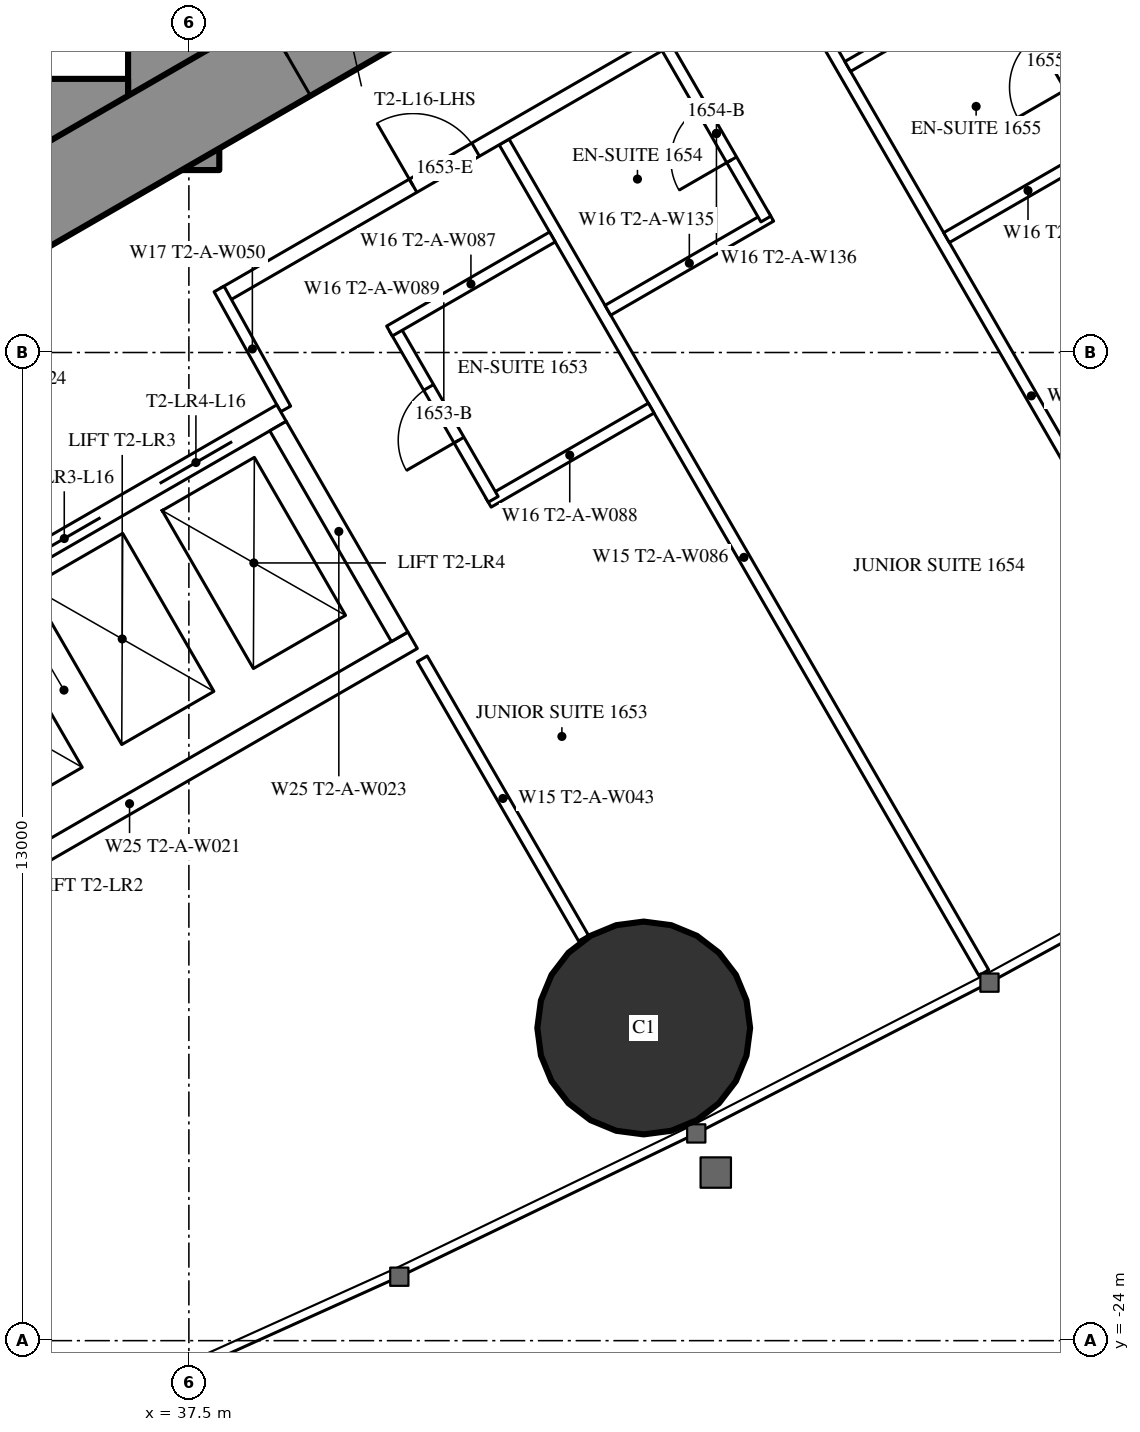
"""IFC4 building model, lengths in metres.
Left out: names, types, materials, properties, quantities, classifications, styles, units other than length and angle.
Written with IfcOpenShell. Run it as: python <this file> out.ifc"""

import sys

from ifc_helpers import new_model, si_unit, direction, frame, frame_2d, origin, origin_2d, place, context, subcontext, project, spatial, rectangle, hollow_circle, extrude, element, fill, save


model = new_model("IFC4")
c1 = context("Model", 3, precision=1e-05, world=origin(), true_north=direction((0.0, 1.0)))
c2 = subcontext(c1, "Body", "Model", "MODEL_VIEW")
j1 = project(units=[si_unit("LENGTHUNIT", "METRE"), si_unit("PLANEANGLEUNIT", "RADIAN")], contexts=[c1])
p1 = place(None, origin())
s1 = spatial("IfcSite", under=j1, at=p1, CompositionType="ELEMENT")
p2 = place(p1, origin())
s2 = spatial("IfcBuilding", under=s1, at=p2, CompositionType="ELEMENT")
p3 = place(p2, frame((0.0, 0.0, 63.5)))
s3 = spatial("IfcBuildingStorey", under=s2, at=p3, CompositionType="ELEMENT", Elevation=63.5)
p4 = place(p3, frame((43.484, -19.886, 0.0), z_axis=(0.0, 0.0, 1.0), x_axis=(1.0, 0.0, 0.0)))
e1 = element("IfcColumn", 1, at=p4, inside=s3, PredefinedType="COLUMN", context=c2, shape_type="SweptSolid", body=[
    extrude(hollow_circle(Radius=1.4, WallThickness=0.12, at=origin_2d()), origin(), (0.0, 0.0, 1.0), 3.5),
])
p5 = place(p3, frame((37.3, -8.6, 0.0), z_axis=(0.0, 0.0, 1.0), x_axis=(0.0, 1.0, 0.0)))
e2 = element("IfcWall", 2, at=p5, inside=s3, PredefinedType="SHEAR", context=c2, shape_type="SweptSolid", body=[
    extrude(rectangle(XDim=17.2, YDim=1.2, at=frame_2d((8.6, 0.0))), origin(), (0.0, 0.0, 1.0), 3.5),
])
p6 = place(p5, frame((7.7, 0.0, 0.0)))
e3 = element("IfcOpeningElement", 3, at=p6, cuts=e2, PredefinedType="OPENING", context=c2, shape_type="SweptSolid", body=[
    extrude(rectangle(XDim=1.8, YDim=2.2, at=frame_2d((0.9, 1.1))), frame((0.0, 0.61, 0.0), z_axis=(0.0, -1.0, 0.0), x_axis=(1.0, 0.0, 0.0)), (0.0, 0.0, 1.0), 1.22),
])
p7 = place(p3, frame((28.3, -8.0, 0.0), z_axis=(0.0, 0.0, 1.0), x_axis=(1.0, 0.0, 0.0)))
e4 = element("IfcWall", 4, at=p7, inside=s3, PredefinedType="SHEAR", context=c2, shape_type="SweptSolid", body=[
    extrude(rectangle(XDim=8.4, YDim=1.2, at=frame_2d((4.2, 0.0))), origin(), (0.0, 0.0, 1.0), 3.5),
])
p8 = place(p7, frame((0.25, 0.0, 0.0)))
e5 = element("IfcOpeningElement", 5, at=p8, cuts=e4, PredefinedType="OPENING", context=c2, shape_type="SweptSolid", body=[
    extrude(rectangle(XDim=1.0, YDim=2.2, at=frame_2d((0.5, 1.1))), frame((0.0, 0.61, 0.0), z_axis=(0.0, -1.0, 0.0), x_axis=(1.0, 0.0, 0.0)), (0.0, 0.0, 1.0), 1.22),
])
p9 = place(p3, frame((27.2, -13.8, 0.0), z_axis=(0.0, 0.0, 1.0), x_axis=(0.866027159892, 0.499996958321, 0.0)))
e6 = element("IfcWall", 6, at=p9, inside=s3, PredefinedType="SHEAR", context=c2, shape_type="SweptSolid", body=[
    extrude(rectangle(XDim=27.947, YDim=1.2, at=frame_2d((13.973, 0.0))), origin(), (0.0, 0.0, 1.0), 3.5),
])
p10 = place(p9, frame((4.6, 0.0, 0.0)))
e7 = element("IfcOpeningElement", 7, at=p10, cuts=e6, PredefinedType="OPENING", context=c2, shape_type="SweptSolid", body=[
    extrude(rectangle(XDim=1.0, YDim=2.2, at=frame_2d((0.5, 1.1))), frame((0.0, 0.61, 0.0), z_axis=(0.0, -1.0, 0.0), x_axis=(1.0, 0.0, 0.0)), (0.0, 0.0, 1.0), 1.22),
])
p11 = place(p9, frame((13.395, 0.0, 0.0)))
e8 = element("IfcOpeningElement", 8, at=p11, cuts=e6, PredefinedType="OPENING", context=c2, shape_type="SweptSolid", body=[
    extrude(rectangle(XDim=1.8, YDim=2.2, at=frame_2d((0.9, 1.1))), frame((0.0, 0.61, 0.0), z_axis=(0.0, -1.0, 0.0), x_axis=(1.0, 0.0, 0.0)), (0.0, 0.0, 1.0), 1.22),
])
p12 = place(p3, frame((41.647, -8.23, 0.0), z_axis=(0.0, 0.0, 1.0), x_axis=(0.49998590462, -0.866033541603, 0.0)))
e9 = element("IfcWall", 9, at=p12, inside=s3, PredefinedType="PARTITIONING", context=c2, shape_type="SweptSolid", body=[
    extrude(rectangle(XDim=12.621, YDim=0.15, at=frame_2d((6.311, 0.0))), origin(), (0.0, 0.0, 1.0), 3.25),
])
p13 = place(p3, frame((45.403, -6.062, 0.0), z_axis=(0.0, 0.0, 1.0), x_axis=(0.500007077968, -0.866021317279, 0.0)))
e10 = element("IfcWall", 10, at=p13, inside=s3, PredefinedType="PARTITIONING", context=c2, shape_type="SweptSolid", body=[
    extrude(rectangle(XDim=12.721, YDim=0.15, at=frame_2d((6.361, 0.0))), origin(), (0.0, 0.0, 1.0), 3.25),
])
p14 = place(p3, frame((40.57, -15.03, 0.0), z_axis=(0.0, 0.0, 1.0), x_axis=(0.500012993597, -0.866017901798, 0.0)))
e11 = element("IfcWall", 11, at=p14, inside=s3, PredefinedType="PARTITIONING", context=c2, shape_type="SweptSolid", body=[
    extrude(rectangle(XDim=4.243, YDim=0.15, at=frame_2d((2.122, 0.0))), origin(), (0.0, 0.0, 1.0), 3.25),
])
p15 = place(p3, frame((37.96, -10.243, 0.0), z_axis=(0.0, 0.0, 1.0), x_axis=(0.866026429433, 0.499998223521, 0.0)))
e12 = element("IfcWall", 12, at=p15, inside=s3, PredefinedType="PARTITIONING", context=c2, shape_type="SweptSolid", body=[
    extrude(rectangle(XDim=20.487, YDim=0.2, at=frame_2d((10.243, 0.0))), origin(), (0.0, 0.0, 1.0), 3.25),
])
p16 = place(p15, frame((6.925, 0.0, 0.0)))
e13 = element("IfcOpeningElement", 13, at=p16, cuts=e12, PredefinedType="OPENING", context=c2, shape_type="SweptSolid", body=[
    extrude(rectangle(XDim=0.95, YDim=2.2, at=frame_2d((0.475, 1.1))), frame((0.0, 0.11, 0.0), z_axis=(0.0, -1.0, 0.0), x_axis=(1.0, 0.0, 0.0)), (0.0, 0.0, 1.0), 0.22),
])
p17 = place(p15, frame((8.912, 0.0, 0.0)))
e14 = element("IfcOpeningElement", 14, at=p17, cuts=e12, PredefinedType="OPENING", context=c2, shape_type="SweptSolid", body=[
    extrude(rectangle(XDim=0.95, YDim=2.2, at=frame_2d((0.475, 1.1))), frame((0.0, 0.11, 0.0), z_axis=(0.0, -1.0, 0.0), x_axis=(1.0, 0.0, 0.0)), (0.0, 0.0, 1.0), 0.22),
])
p18 = place(p15, frame((13.535, 0.0, 0.0)))
e15 = element("IfcOpeningElement", 15, at=p18, cuts=e12, PredefinedType="OPENING", context=c2, shape_type="SweptSolid", body=[
    extrude(rectangle(XDim=0.95, YDim=2.2, at=frame_2d((0.475, 1.1))), frame((0.0, 0.11, 0.0), z_axis=(0.0, -1.0, 0.0), x_axis=(1.0, 0.0, 0.0)), (0.0, 0.0, 1.0), 0.22),
])
p19 = place(p15, frame((17.585, 0.0, 0.0)))
e16 = element("IfcOpeningElement", 16, at=p19, cuts=e12, PredefinedType="OPENING", context=c2, shape_type="SweptSolid", body=[
    extrude(rectangle(XDim=0.95, YDim=2.2, at=frame_2d((0.475, 1.1))), frame((0.0, 0.11, 0.0), z_axis=(0.0, -1.0, 0.0), x_axis=(1.0, 0.0, 0.0)), (0.0, 0.0, 1.0), 0.22),
])
p20 = place(p15, frame((2.875, 0.0, 0.0)))
e17 = element("IfcOpeningElement", 17, at=p20, cuts=e12, PredefinedType="OPENING", context=c2, shape_type="SweptSolid", body=[
    extrude(rectangle(XDim=0.95, YDim=2.2, at=frame_2d((0.475, 1.1))), frame((0.0, 0.11, 0.0), z_axis=(0.0, -1.0, 0.0), x_axis=(1.0, 0.0, 0.0)), (0.0, 0.0, 1.0), 0.22),
])
p21 = place(p3, frame((38.773, -11.742, 0.0), z_axis=(0.0, 0.0, 1.0), x_axis=(-0.485528096672, 0.8742210632, 0.0)))
e18 = element("IfcWall", 18, at=p21, inside=s3, PredefinedType="PARTITIONING", context=c2, shape_type="SweptSolid", body=[
    extrude(rectangle(XDim=1.805, YDim=0.15, at=frame_2d((0.903, 0.0))), origin(), (0.0, 0.0, 1.0), 3.25),
])
p22 = place(p3, frame((43.012, -10.444, 0.0), z_axis=(0.0, 0.0, 1.0), x_axis=(0.866031185235, 0.4999899861, 0.0)))
e19 = element("IfcWall", 19, at=p22, inside=s3, PredefinedType="PARTITIONING", context=c2, shape_type="SweptSolid", body=[
    extrude(rectangle(XDim=2.475, YDim=0.15, at=frame_2d((1.238, 0.0))), origin(), (0.0, 0.0, 1.0), 3.25),
])
p23 = place(p3, frame((43.791, -6.993, 0.0), z_axis=(0.0, 0.0, 1.0), x_axis=(0.500047596559, -0.865997922154, 0.0)))
e20 = element("IfcWall", 20, at=p23, inside=s3, PredefinedType="PARTITIONING", context=c2, shape_type="SweptSolid", body=[
    extrude(rectangle(XDim=2.6, YDim=0.15, at=frame_2d((1.3, 0.0))), origin(), (0.0, 0.0, 1.0), 3.25),
])
p24 = place(p23, frame((0.9, 0.0, 0.0)))
e21 = element("IfcOpeningElement", 21, at=p24, cuts=e20, PredefinedType="OPENING", context=c2, shape_type="SweptSolid", body=[
    extrude(rectangle(XDim=0.8, YDim=2.2, at=frame_2d((0.4, 1.1))), frame((0.0, 0.085, 0.0), z_axis=(0.0, -1.0, 0.0), x_axis=(1.0, 0.0, 0.0)), (0.0, 0.0, 1.0), 0.17),
])
p25 = place(p3, frame((47.468, -9.488, 0.0), z_axis=(0.0, 0.0, 1.0), x_axis=(0.86604923931, 0.499958713387, 0.0)))
e22 = element("IfcWall", 22, at=p25, inside=s3, PredefinedType="PARTITIONING", context=c2, shape_type="SweptSolid", body=[
    extrude(rectangle(XDim=2.475, YDim=0.15, at=frame_2d((1.237, 0.0))), origin(), (0.0, 0.0, 1.0), 3.25),
])
p26 = place(p3, frame((48.246, -6.037, 0.0), z_axis=(0.0, 0.0, 1.0), x_axis=(0.500006934395, -0.866021400173, 0.0)))
e23 = element("IfcWall", 23, at=p26, inside=s3, PredefinedType="PARTITIONING", context=c2, shape_type="SweptSolid", body=[
    extrude(rectangle(XDim=2.6, YDim=0.15, at=frame_2d((1.3, 0.0))), origin(), (0.0, 0.0, 1.0), 3.25),
])
p27 = place(p26, frame((0.9, 0.0, 0.0)))
e24 = element("IfcOpeningElement", 24, at=p27, cuts=e23, PredefinedType="OPENING", context=c2, shape_type="SweptSolid", body=[
    extrude(rectangle(XDim=0.8, YDim=2.2, at=frame_2d((0.4, 1.1))), frame((0.0, 0.085, 0.0), z_axis=(0.0, -1.0, 0.0), x_axis=(1.0, 0.0, 0.0)), (0.0, 0.0, 1.0), 0.17),
])
p28 = place(p3, frame((46.168, -7.237, 0.0), z_axis=(0.0, 0.0, 1.0), x_axis=(0.866006523861, 0.500032699561, 0.0)))
e25 = element("IfcWall", 25, at=p28, inside=s3, PredefinedType="PARTITIONING", context=c2, shape_type="SweptSolid", body=[
    extrude(rectangle(XDim=2.475, YDim=0.15, at=frame_2d((1.237, 0.0))), origin(), (0.0, 0.0, 1.0), 3.25),
])
p29 = place(p3, frame((41.439, -12.969, 0.0), z_axis=(0.0, 0.0, 1.0), x_axis=(0.866031185235, 0.4999899861, 0.0)))
e26 = element("IfcWall", 26, at=p29, inside=s3, PredefinedType="PARTITIONING", context=c2, shape_type="SweptSolid", body=[
    extrude(rectangle(XDim=2.475, YDim=0.15, at=frame_2d((1.238, 0.0))), origin(), (0.0, 0.0, 1.0), 3.25),
])
p30 = place(p3, frame((40.204, -10.68, 0.0), z_axis=(0.0, 0.0, 1.0), x_axis=(0.500006934395, -0.866021400173, 0.0)))
e27 = element("IfcWall", 27, at=p30, inside=s3, PredefinedType="PARTITIONING", context=c2, shape_type="SweptSolid", body=[
    extrude(rectangle(XDim=2.6, YDim=0.15, at=frame_2d((1.3, 0.0))), origin(), (0.0, 0.0, 1.0), 3.25),
])
p31 = place(p30, frame((0.9, 0.0, 0.0)))
e28 = element("IfcOpeningElement", 28, at=p31, cuts=e27, PredefinedType="OPENING", context=c2, shape_type="SweptSolid", body=[
    extrude(rectangle(XDim=0.8, YDim=2.2, at=frame_2d((0.4, 1.1))), frame((0.0, 0.085, 0.0), z_axis=(0.0, -1.0, 0.0), x_axis=(1.0, 0.0, 0.0)), (0.0, 0.0, 1.0), 0.17),
])
p32 = place(p3, frame((40.139, -10.718, 0.0), z_axis=(0.0, 0.0, 1.0), x_axis=(0.866031185235, 0.4999899861, 0.0)))
e29 = element("IfcWall", 29, at=p32, inside=s3, PredefinedType="PARTITIONING", context=c2, shape_type="SweptSolid", body=[
    extrude(rectangle(XDim=2.475, YDim=0.15, at=frame_2d((1.238, 0.0))), origin(), (0.0, 0.0, 1.0), 3.25),
])
p33 = place(p3, frame((31.271, -16.097, 0.0), z_axis=(0.0, 0.0, 1.0), x_axis=(0.86604045752, 0.499973925258, 0.0)))
e30 = element("IfcWall", 30, at=p33, inside=s3, PredefinedType="PARTITIONING", context=c2, shape_type="SweptSolid", body=[
    extrude(rectangle(XDim=8.6, YDim=0.25, at=frame_2d((4.3, 0.0))), origin(), (0.0, 0.0, 1.0), 3.25),
])
p34 = place(p33, frame((0.75, 0.0, 0.0)))
e31 = element("IfcOpeningElement", 31, at=p34, cuts=e30, PredefinedType="OPENING", context=c2, shape_type="SweptSolid", body=[
    extrude(rectangle(XDim=1.1, YDim=2.2, at=frame_2d((0.55, 1.1))), frame((0.0, 0.135, 0.0), z_axis=(0.0, -1.0, 0.0), x_axis=(1.0, 0.0, 0.0)), (0.0, 0.0, 1.0), 0.27),
])
p35 = place(p33, frame((2.75, 0.0, 0.0)))
e32 = element("IfcOpeningElement", 32, at=p35, cuts=e30, PredefinedType="OPENING", context=c2, shape_type="SweptSolid", body=[
    extrude(rectangle(XDim=1.1, YDim=2.2, at=frame_2d((0.55, 1.1))), frame((0.0, 0.135, 0.0), z_axis=(0.0, -1.0, 0.0), x_axis=(1.0, 0.0, 0.0)), (0.0, 0.0, 1.0), 0.27),
])
p36 = place(p33, frame((4.75, 0.0, 0.0)))
e33 = element("IfcOpeningElement", 33, at=p36, cuts=e30, PredefinedType="OPENING", context=c2, shape_type="SweptSolid", body=[
    extrude(rectangle(XDim=1.1, YDim=2.2, at=frame_2d((0.55, 1.1))), frame((0.0, 0.135, 0.0), z_axis=(0.0, -1.0, 0.0), x_axis=(1.0, 0.0, 0.0)), (0.0, 0.0, 1.0), 0.27),
])
p37 = place(p33, frame((6.75, 0.0, 0.0)))
e34 = element("IfcOpeningElement", 34, at=p37, cuts=e30, PredefinedType="OPENING", context=c2, shape_type="SweptSolid", body=[
    extrude(rectangle(XDim=1.1, YDim=2.2, at=frame_2d((0.55, 1.1))), frame((0.0, 0.135, 0.0), z_axis=(0.0, -1.0, 0.0), x_axis=(1.0, 0.0, 0.0)), (0.0, 0.0, 1.0), 0.27),
])
p38 = place(p3, frame((32.996, -19.086, 0.0), z_axis=(0.0, 0.0, 1.0), x_axis=(0.866028165386, 0.499995216735, 0.0)))
e35 = element("IfcWall", 35, at=p38, inside=s3, PredefinedType="PARTITIONING", context=c2, shape_type="SweptSolid", body=[
    extrude(rectangle(XDim=8.6, YDim=0.25, at=frame_2d((4.3, 0.0))), origin(), (0.0, 0.0, 1.0), 3.25),
])
p39 = place(p3, frame((38.673, -11.968, 0.0), z_axis=(0.0, 0.0, 1.0), x_axis=(0.499929347863, -0.866066190972, 0.0)))
e36 = element("IfcWall", 36, at=p39, inside=s3, PredefinedType="PARTITIONING", context=c2, shape_type="SweptSolid", body=[
    extrude(rectangle(XDim=3.201, YDim=0.25, at=frame_2d((1.6, 0.0))), origin(), (0.0, 0.0, 1.0), 3.25),
])
p40 = place(p24, origin())
e37 = element("IfcDoor", 37, at=p40, inside=s3, OperationType="SINGLE_SWING_RIGHT", PredefinedType="DOOR", context=c2, shape_type="SweptSolid", body=[
    extrude(rectangle(XDim=0.8, YDim=2.2, at=frame_2d((0.4, 1.1))), frame((0.0, 0.025, 0.0), z_axis=(0.0, -1.0, 0.0), x_axis=(1.0, 0.0, 0.0)), (0.0, 0.0, 1.0), 0.05),
])
fill(e21, e37)
p41 = place(p27, origin())
e38 = element("IfcDoor", 38, at=p41, inside=s3, OperationType="SINGLE_SWING_RIGHT", PredefinedType="DOOR", context=c2, shape_type="SweptSolid", body=[
    extrude(rectangle(XDim=0.8, YDim=2.2, at=frame_2d((0.4, 1.1))), frame((0.0, 0.025, 0.0), z_axis=(0.0, -1.0, 0.0), x_axis=(1.0, 0.0, 0.0)), (0.0, 0.0, 1.0), 0.05),
])
fill(e24, e38)
p42 = place(p31, origin())
e39 = element("IfcDoor", 39, at=p42, inside=s3, OperationType="SINGLE_SWING_RIGHT", PredefinedType="DOOR", context=c2, shape_type="SweptSolid", body=[
    extrude(rectangle(XDim=0.8, YDim=2.2, at=frame_2d((0.4, 1.1))), frame((0.0, 0.025, 0.0), z_axis=(0.0, -1.0, 0.0), x_axis=(1.0, 0.0, 0.0)), (0.0, 0.0, 1.0), 0.05),
])
fill(e28, e39)
p43 = place(p20, origin())
e40 = element("IfcDoor", 40, at=p43, inside=s3, OperationType="SINGLE_SWING_LEFT", PredefinedType="DOOR", context=c2, shape_type="SweptSolid", body=[
    extrude(rectangle(XDim=0.95, YDim=2.2, at=frame_2d((0.475, 1.1))), frame((0.0, 0.025, 0.0), z_axis=(0.0, -1.0, 0.0), x_axis=(1.0, 0.0, 0.0)), (0.0, 0.0, 1.0), 0.05),
])
fill(e17, e40)
p44 = place(p11, origin())
e41 = element("IfcDoor", 41, at=p44, inside=s3, OperationType="DOUBLE_DOOR_SINGLE_SWING", PredefinedType="DOOR", context=c2, shape_type="SweptSolid", body=[
    extrude(rectangle(XDim=1.8, YDim=2.2, at=frame_2d((0.9, 1.1))), frame((0.0, 0.025, 0.0), z_axis=(0.0, -1.0, 0.0), x_axis=(1.0, 0.0, 0.0)), (0.0, 0.0, 1.0), 0.05),
])
fill(e8, e41)
p45 = place(p36, origin())
e42 = element("IfcDoor", 42, at=p45, inside=s3, OperationType="DOUBLE_DOOR_SLIDING", PredefinedType="USERDEFINED", context=c2, shape_type="SweptSolid", body=[
    extrude(rectangle(XDim=1.1, YDim=2.2, at=frame_2d((0.55, 1.1))), frame((0.0, 0.025, 0.0), z_axis=(0.0, -1.0, 0.0), x_axis=(1.0, 0.0, 0.0)), (0.0, 0.0, 1.0), 0.05),
])
fill(e33, e42)
p46 = place(p37, origin())
e43 = element("IfcDoor", 43, at=p46, inside=s3, OperationType="DOUBLE_DOOR_SLIDING", PredefinedType="USERDEFINED", context=c2, shape_type="SweptSolid", body=[
    extrude(rectangle(XDim=1.1, YDim=2.2, at=frame_2d((0.55, 1.1))), frame((0.0, 0.025, 0.0), z_axis=(0.0, -1.0, 0.0), x_axis=(1.0, 0.0, 0.0)), (0.0, 0.0, 1.0), 0.05),
])
fill(e34, e43)
save(model, sys.argv[1])
